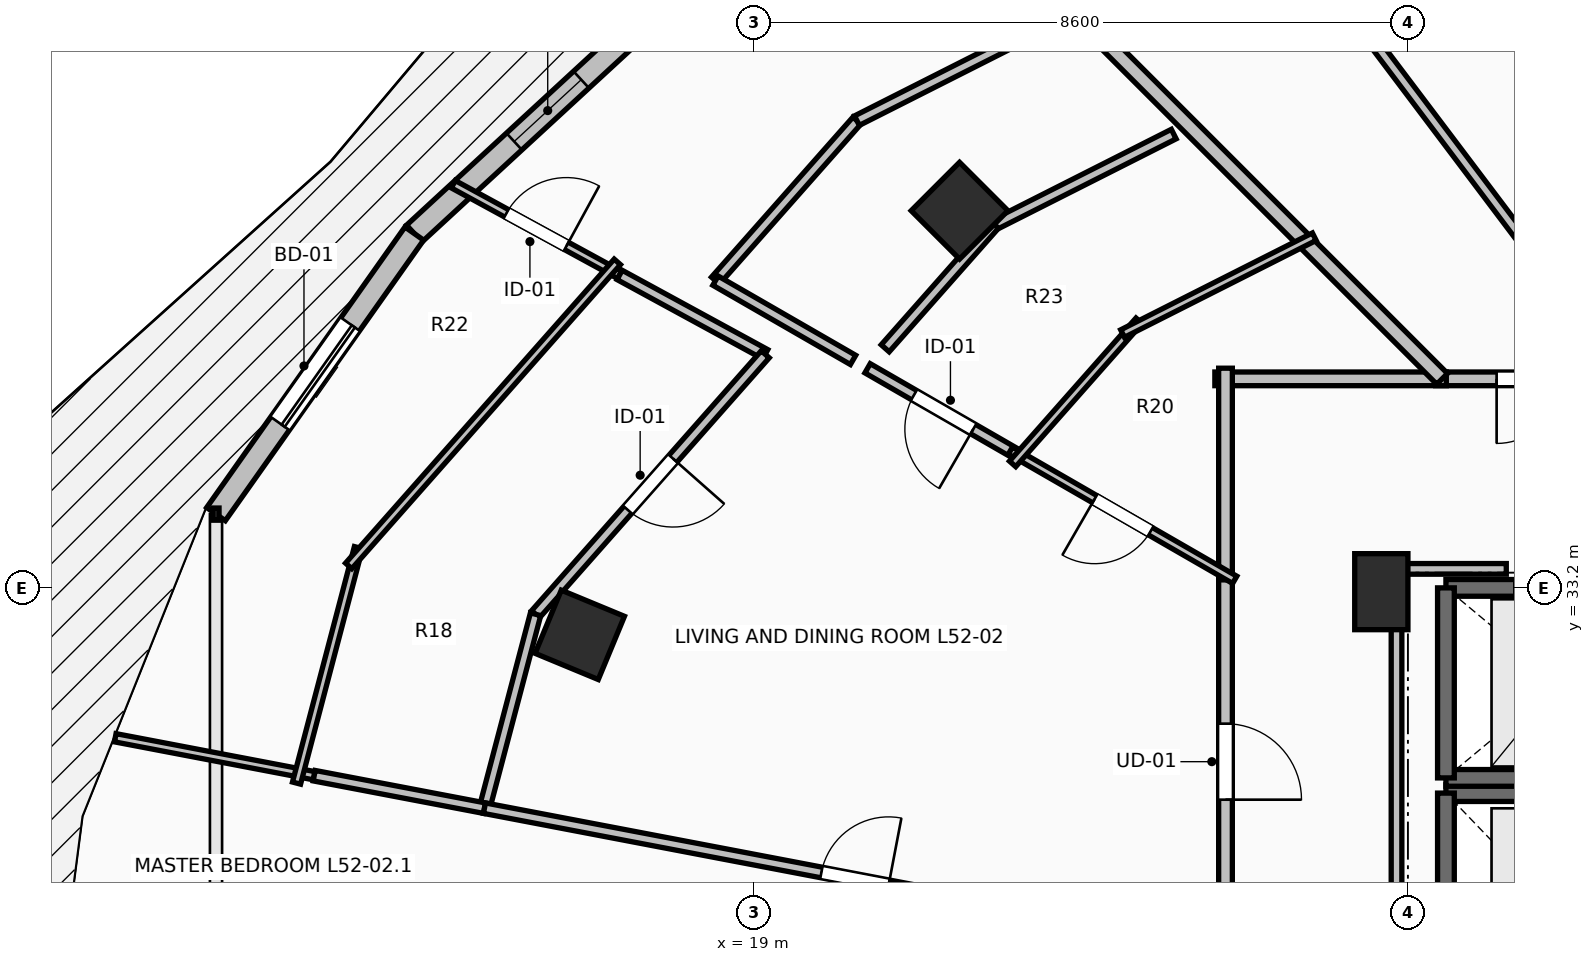
"""IFC4 building model, lengths in metres.
Left out: names, types, materials, properties, quantities, classifications, styles, units other than length and angle.
Written with IfcOpenShell. Run it as: python <this file> out.ifc"""

import sys

from ifc_helpers import new_model, si_unit, direction, frame, frame_2d, origin, origin_2d, place, context, subcontext, project, spatial, rectangle, extrude, element, fill, save


model = new_model("IFC4")
c1 = context("Model", 3, precision=1e-05, world=origin(), true_north=direction((0.0, 1.0)))
c2 = subcontext(c1, "Body", "Model", "MODEL_VIEW")
j1 = project(units=[si_unit("LENGTHUNIT", "METRE"), si_unit("PLANEANGLEUNIT", "RADIAN")], contexts=[c1])
p1 = place(None, origin())
s1 = spatial("IfcSite", under=j1, at=p1, CompositionType="ELEMENT")
p2 = place(p1, origin())
s2 = spatial("IfcBuilding", under=s1, at=p2, CompositionType="ELEMENT")
p3 = place(p2, frame((0.0, 0.0, 193.1)))
s3 = spatial("IfcBuildingStorey", under=s2, at=p3, CompositionType="ELEMENT", Elevation=193.1)
for number, where, z_axis, x_axis in (
    (1, (21.701, 38.162, 0.0), (0.0, 0.0, 1.0), (-0.707, 0.707, 0.0)),
    (2, (16.705, 32.582, 0.0), (0.0, 0.0, 1.0), (-0.924, 0.383, 0.0)),
):
    element("IfcColumn", number, at=place(p3, frame(where, z_axis=z_axis, x_axis=x_axis)), inside=s3, PredefinedType="COLUMN", context=c2, shape_type="SweptSolid", body=[
        extrude(rectangle(XDim=0.9, YDim=0.9, at=origin_2d()), origin(), (0.0, 0.0, 1.0), 3.5),
    ])
p4 = place(p3, frame((27.25, 33.15, 0.0), z_axis=(0.0, 0.0, 1.0), x_axis=(1.0, 0.0, 0.0)))
e3 = element("IfcColumn", 3, at=p4, inside=s3, PredefinedType="PILASTER", context=c2, shape_type="SweptSolid", body=[
    extrude(rectangle(XDim=0.7, YDim=1.0, at=origin_2d()), origin(), (0.0, 0.0, 1.0), 3.5),
])
p5 = place(p3, frame((18.038, 41.097, 0.0), z_axis=(0.0, 0.0, 1.0), x_axis=(-0.735359993374, -0.677676678177, 0.0)))
e4 = element("IfcWall", 4, at=p5, inside=s3, PredefinedType="STANDARD", context=c2, shape_type="SweptSolid", body=[
    extrude(rectangle(XDim=4.774, YDim=0.3, at=frame_2d((2.387, 0.0))), origin(), (0.0, 0.0, 1.0), 3.24),
])
p6 = place(p5, frame((1.787, 0.0, 0.85)))
e5 = element("IfcOpeningElement", 5, at=p6, cuts=e4, PredefinedType="OPENING", context=c2, shape_type="SweptSolid", body=[
    extrude(rectangle(XDim=1.2, YDim=2.1, at=frame_2d((0.6, 1.05))), frame((0.0, 0.165, 0.0), z_axis=(0.0, -1.0, 0.0), x_axis=(1.0, 0.0, 0.0)), (0.0, 0.0, 1.0), 0.33),
])
p7 = place(p3, frame((14.528, 37.861, 0.0), z_axis=(0.0, 0.0, 1.0), x_axis=(-0.577168747264, -0.81662490605, 0.0)))
e6 = element("IfcWall", 6, at=p7, inside=s3, PredefinedType="STANDARD", context=c2, shape_type="SweptSolid", body=[
    extrude(rectangle(XDim=4.52, YDim=0.3, at=frame_2d((2.26, 0.0))), origin(), (0.0, 0.0, 1.0), 3.24),
])
p8 = place(p7, frame((1.46, 0.0, 0.0)))
e7 = element("IfcOpeningElement", 7, at=p8, cuts=e6, PredefinedType="OPENING", context=c2, shape_type="SweptSolid", body=[
    extrude(rectangle(XDim=1.6, YDim=2.3, at=frame_2d((0.8, 1.15))), frame((0.0, 0.165, 0.0), z_axis=(0.0, -1.0, 0.0), x_axis=(1.0, 0.0, 0.0)), (0.0, 0.0, 1.0), 0.33),
])
p9 = place(p3, frame((30.5, 30.5, 0.0), z_axis=(0.0, 0.0, 1.0), x_axis=(-1.0, 0.0, 0.0)))
e8 = element("IfcWall", 8, at=p9, inside=s3, PredefinedType="SHEAR", context=c2, shape_type="SweptSolid", body=[
    extrude(rectangle(XDim=2.4, YDim=0.22, at=frame_2d((1.2, 0.0))), origin(), (0.0, 0.0, 1.0), 3.24),
])
p10 = place(p3, frame((28.1, 30.5, 0.0), z_axis=(0.0, 0.0, 1.0), x_axis=(0.0, -1.0, 0.0)))
e9 = element("IfcWall", 9, at=p10, inside=s3, PredefinedType="SHEAR", context=c2, shape_type="SweptSolid", body=[
    extrude(rectangle(XDim=2.5, YDim=0.22, at=frame_2d((1.25, 0.0))), origin(), (0.0, 0.0, 1.0), 3.24),
])
p11 = place(p3, frame((28.1, 30.7, 0.0), z_axis=(0.0, 0.0, 1.0), x_axis=(1.0, 0.0, 0.0)))
e10 = element("IfcWall", 10, at=p11, inside=s3, PredefinedType="SOLIDWALL", context=c2, shape_type="SweptSolid", body=[
    extrude(rectangle(XDim=3.0, YDim=0.22, at=frame_2d((1.5, 0.0))), origin(), (0.0, 0.0, 1.0), 3.24),
])
p12 = place(p3, frame((31.1, 33.2, 0.0), z_axis=(0.0, 0.0, 1.0), x_axis=(-1.0, 0.0, 0.0)))
e11 = element("IfcWall", 11, at=p12, inside=s3, PredefinedType="SOLIDWALL", context=c2, shape_type="SweptSolid", body=[
    extrude(rectangle(XDim=3.0, YDim=0.22, at=frame_2d((1.5, 0.0))), origin(), (0.0, 0.0, 1.0), 3.24),
])
p13 = place(p12, frame((0.9, 0.0, 0.0)))
e12 = element("IfcOpeningElement", 12, at=p13, cuts=e11, PredefinedType="OPENING", context=c2, shape_type="SweptSolid", body=[
    extrude(rectangle(XDim=1.2, YDim=2.2, at=frame_2d((0.6, 1.1))), frame((0.0, 0.125, 0.0), z_axis=(0.0, -1.0, 0.0), x_axis=(1.0, 0.0, 0.0)), (0.0, 0.0, 1.0), 0.25),
])
p14 = place(p3, frame((28.1, 33.2, 0.0), z_axis=(0.0, 0.0, 1.0), x_axis=(0.0, -1.0, 0.0)))
e13 = element("IfcWall", 13, at=p14, inside=s3, PredefinedType="SOLIDWALL", context=c2, shape_type="SweptSolid", body=[
    extrude(rectangle(XDim=2.5, YDim=0.22, at=frame_2d((1.25, 0.0))), origin(), (0.0, 0.0, 1.0), 3.24),
])
p15 = place(p3, frame((30.419, 35.95, 0.0), z_axis=(0.0, 0.0, 1.0), x_axis=(-1.0, 0.0, 0.0)))
e14 = element("IfcWall", 14, at=p15, inside=s3, PredefinedType="PARTITIONING", context=c2, shape_type="SweptSolid", body=[
    extrude(rectangle(XDim=2.454, YDim=0.18, at=frame_2d((1.227, 0.0))), origin(), (0.0, 0.0, 1.0), 2.432),
])
p16 = place(p15, frame((0.802, 0.0, 0.0)))
e15 = element("IfcOpeningElement", 15, at=p16, cuts=e14, PredefinedType="OPENING", context=c2, shape_type="SweptSolid", body=[
    extrude(rectangle(XDim=0.85, YDim=2.1, at=frame_2d((0.425, 1.05))), frame((0.0, 0.105, 0.0), z_axis=(0.0, -1.0, 0.0), x_axis=(1.0, 0.0, 0.0)), (0.0, 0.0, 1.0), 0.21),
])
p17 = place(p3, frame((25.2, 33.445, 0.0), z_axis=(0.0, 0.0, 1.0), x_axis=(0.0, -1.0, 0.0)))
e16 = element("IfcWall", 16, at=p17, inside=s3, PredefinedType="PARTITIONING", context=c2, shape_type="SweptSolid", body=[
    extrude(rectangle(XDim=5.063, YDim=0.18, at=frame_2d((2.531, 0.0))), origin(), (0.0, 0.0, 1.0), 2.432),
])
p18 = place(p17, frame((2.031, 0.0, 0.0)))
e17 = element("IfcOpeningElement", 17, at=p18, cuts=e16, PredefinedType="OPENING", context=c2, shape_type="SweptSolid", body=[
    extrude(rectangle(XDim=1.0, YDim=2.15, at=frame_2d((0.5, 1.075))), frame((0.0, 0.105, 0.0), z_axis=(0.0, -1.0, 0.0), x_axis=(1.0, 0.0, 0.0)), (0.0, 0.0, 1.0), 0.21),
])
p19 = place(p3, frame((28.105, 35.95, 0.0), z_axis=(0.0, 0.0, 1.0), x_axis=(-1.0, 0.0, 0.0)))
e18 = element("IfcWall", 18, at=p19, inside=s3, PredefinedType="PARTITIONING", context=c2, shape_type="SweptSolid", body=[
    extrude(rectangle(XDim=3.045, YDim=0.18, at=frame_2d((1.522, 0.0))), origin(), (0.0, 0.0, 1.0), 2.432),
])
p20 = place(p3, frame((25.2, 36.09, 0.0), z_axis=(0.0, 0.0, 1.0), x_axis=(0.0, -1.0, 0.0)))
e19 = element("IfcWall", 19, at=p20, inside=s3, PredefinedType="PARTITIONING", context=c2, shape_type="SweptSolid", body=[
    extrude(rectangle(XDim=2.785, YDim=0.18, at=frame_2d((1.393, 0.0))), origin(), (0.0, 0.0, 1.0), 2.432),
])
p21 = place(p3, frame((27.069, 45.673, 0.0), z_axis=(0.0, 0.0, 1.0), x_axis=(0.485717471054, -0.874115860921, 0.0)))
e20 = element("IfcWall", 20, at=p21, inside=s3, PredefinedType="PARTITIONING", context=c2, shape_type="SweptSolid", body=[
    extrude(rectangle(XDim=11.123, YDim=0.14, at=frame_2d((5.562, 0.0))), origin(), (0.0, 0.0, 1.0), 2.432),
])
p22 = place(p3, frame((24.075, 44.46, 0.0), z_axis=(0.0, 0.0, 1.0), x_axis=(0.602185523072, -0.798356183544, 0.0)))
e21 = element("IfcWall", 21, at=p22, inside=s3, PredefinedType="PARTITIONING", context=c2, shape_type="SweptSolid", body=[
    extrude(rectangle(XDim=10.659, YDim=0.14, at=frame_2d((5.33, 0.0))), origin(), (0.0, 0.0, 1.0), 2.432),
])
p23 = place(p3, frame((21.041, 42.959, 0.0), z_axis=(0.0, 0.0, 1.0), x_axis=(0.707106781187, -0.707106781187, 0.0)))
e22 = element("IfcWall", 22, at=p23, inside=s3, PredefinedType="PARTITIONING", context=c2, shape_type="SweptSolid", body=[
    extrude(rectangle(XDim=9.912, YDim=0.2, at=frame_2d((4.956, 0.0))), origin(), (0.0, 0.0, 1.0), 2.432),
])
p24 = place(p3, frame((22.492, 34.936, 0.0), z_axis=(0.0, 0.0, 1.0), x_axis=(-0.866435390844, 0.499289208267, 0.0)))
e23 = element("IfcWall", 23, at=p24, inside=s3, PredefinedType="PARTITIONING", context=c2, shape_type="SweptSolid", body=[
    extrude(rectangle(XDim=2.309, YDim=0.14, at=frame_2d((1.155, 0.0))), origin(), (0.0, 0.0, 1.0), 2.922),
])
p25 = place(p24, frame((0.705, 0.0, 0.0)))
e24 = element("IfcOpeningElement", 24, at=p25, cuts=e23, PredefinedType="OPENING", context=c2, shape_type="SweptSolid", body=[
    extrude(rectangle(XDim=0.9, YDim=2.1, at=frame_2d((0.45, 1.05))), frame((0.0, 0.085, 0.0), z_axis=(0.0, -1.0, 0.0), x_axis=(1.0, 0.0, 0.0)), (0.0, 0.0, 1.0), 0.17),
])
p26 = place(p3, frame((25.321, 33.306, 0.0), z_axis=(0.0, 0.0, 1.0), x_axis=(-0.866517217622, 0.49914718427, 0.0)))
e25 = element("IfcWall", 25, at=p26, inside=s3, PredefinedType="PARTITIONING", context=c2, shape_type="SweptSolid", body=[
    extrude(rectangle(XDim=3.405, YDim=0.11, at=frame_2d((1.703, 0.0))), origin(), (0.0, 0.0, 1.0), 2.922),
])
p27 = place(p26, frame((1.278, 0.0, 0.0)))
e26 = element("IfcOpeningElement", 26, at=p27, cuts=e25, PredefinedType="OPENING", context=c2, shape_type="SweptSolid", body=[
    extrude(rectangle(XDim=0.85, YDim=2.1, at=frame_2d((0.425, 1.05))), frame((0.0, 0.07, 0.0), z_axis=(0.0, -1.0, 0.0), x_axis=(1.0, 0.0, 0.0)), (0.0, 0.0, 1.0), 0.14),
])
p28 = place(p3, frame((15.041, 38.51, 0.0), z_axis=(0.0, 0.0, 1.0), x_axis=(0.877951724479, -0.478749171784, 0.0)))
e27 = element("IfcWall", 27, at=p28, inside=s3, PredefinedType="PARTITIONING", context=c2, shape_type="SweptSolid", body=[
    extrude(rectangle(XDim=2.492, YDim=0.11, at=frame_2d((1.246, 0.0))), origin(), (0.0, 0.0, 1.0), 3.24),
])
p29 = place(p28, frame((0.796, 0.0, 0.0)))
e28 = element("IfcOpeningElement", 28, at=p29, cuts=e27, PredefinedType="OPENING", context=c2, shape_type="SweptSolid", body=[
    extrude(rectangle(XDim=0.9, YDim=2.1, at=frame_2d((0.45, 1.05))), frame((0.0, 0.07, 0.0), z_axis=(0.0, -1.0, 0.0), x_axis=(1.0, 0.0, 0.0)), (0.0, 0.0, 1.0), 0.14),
])
p30 = place(p3, frame((13.21, 30.729, 0.0), z_axis=(0.0, 0.0, 1.0), x_axis=(-0.982266305937, 0.187491077708, 0.0)))
e29 = element("IfcWall", 29, at=p30, inside=s3, PredefinedType="PARTITIONING", context=c2, shape_type="SweptSolid", body=[
    extrude(rectangle(XDim=2.664, YDim=0.11, at=frame_2d((1.332, 0.0))), origin(), (0.0, 0.0, 1.0), 3.24),
])
p31 = place(p3, frame((17.229, 37.317, 0.0), z_axis=(0.0, 0.0, 1.0), x_axis=(0.878117834212, -0.47844442649, 0.0)))
e30 = element("IfcWall", 30, at=p31, inside=s3, PredefinedType="PARTITIONING", context=c2, shape_type="SweptSolid", body=[
    extrude(rectangle(XDim=2.182, YDim=0.14, at=frame_2d((1.091, 0.0))), origin(), (0.0, 0.0, 1.0), 3.24),
])
p32 = place(p3, frame((19.145, 36.273, 0.0), z_axis=(0.0, 0.0, 1.0), x_axis=(-0.662162868769, -0.749359950373, 0.0)))
e31 = element("IfcWall", 31, at=p32, inside=s3, PredefinedType="PARTITIONING", context=c2, shape_type="SweptSolid", body=[
    extrude(rectangle(XDim=4.564, YDim=0.14, at=frame_2d((2.282, 0.0))), origin(), (0.0, 0.0, 1.0), 3.24),
])
p33 = place(p32, frame((1.832, 0.0, 0.0)))
e32 = element("IfcOpeningElement", 32, at=p33, cuts=e31, PredefinedType="OPENING", context=c2, shape_type="SweptSolid", body=[
    extrude(rectangle(XDim=0.9, YDim=2.1, at=frame_2d((0.45, 1.05))), frame((0.0, 0.085, 0.0), z_axis=(0.0, -1.0, 0.0), x_axis=(1.0, 0.0, 0.0)), (0.0, 0.0, 1.0), 0.17),
])
p34 = place(p3, frame((16.123, 32.853, 0.0), z_axis=(0.0, 0.0, 1.0), x_axis=(-0.254775717765, -0.967000172512, 0.0)))
e33 = element("IfcWall", 33, at=p34, inside=s3, PredefinedType="PARTITIONING", context=c2, shape_type="SweptSolid", body=[
    extrude(rectangle(XDim=2.638, YDim=0.14, at=frame_2d((1.319, 0.0))), origin(), (0.0, 0.0, 1.0), 3.24),
])
p35 = place(p3, frame((15.451, 30.302, 0.0), z_axis=(0.0, 0.0, 1.0), x_axis=(-0.982295439063, 0.187338384738, 0.0)))
e34 = element("IfcWall", 34, at=p35, inside=s3, PredefinedType="PARTITIONING", context=c2, shape_type="SweptSolid", body=[
    extrude(rectangle(XDim=2.281, YDim=0.14, at=frame_2d((1.14, 0.0))), origin(), (0.0, 0.0, 1.0), 3.24),
])
p36 = place(p3, frame((15.451, 30.302, 0.0), z_axis=(0.0, 0.0, 1.0), x_axis=(0.982284698783, -0.187394691859, 0.0)))
e35 = element("IfcWall", 35, at=p36, inside=s3, PredefinedType="PARTITIONING", context=c2, shape_type="SweptSolid", body=[
    extrude(rectangle(XDim=9.925, YDim=0.14, at=frame_2d((4.962, 0.0))), origin(), (0.0, 0.0, 1.0), 2.774),
])
p37 = place(p36, frame((4.512, 0.0, 0.0)))
e36 = element("IfcOpeningElement", 36, at=p37, cuts=e35, PredefinedType="OPENING", context=c2, shape_type="SweptSolid", body=[
    extrude(rectangle(XDim=0.9, YDim=2.1, at=frame_2d((0.45, 1.05))), frame((0.0, 0.085, 0.0), z_axis=(0.0, -1.0, 0.0), x_axis=(1.0, 0.0, 0.0)), (0.0, 0.0, 1.0), 0.17),
])
p38 = place(p3, frame((22.399, 34.831, 0.0), z_axis=(0.0, 0.0, 1.0), x_axis=(0.662292938072, 0.749244996099, 0.0)))
e37 = element("IfcWall", 37, at=p38, inside=s3, PredefinedType="PARTITIONING", context=c2, shape_type="SweptSolid", body=[
    extrude(rectangle(XDim=2.513, YDim=0.11, at=frame_2d((1.256, 0.0))), origin(), (0.0, 0.0, 1.0), 2.432),
])
p39 = place(p3, frame((23.846, 36.546, 0.0), z_axis=(0.0, 0.0, 1.0), x_axis=(0.892553076465, 0.450942352959, 0.0)))
e38 = element("IfcWall", 38, at=p39, inside=s3, PredefinedType="PARTITIONING", context=c2, shape_type="SweptSolid", body=[
    extrude(rectangle(XDim=2.826, YDim=0.11, at=frame_2d((1.413, 0.0))), origin(), (0.0, 0.0, 1.0), 2.432),
])
p40 = place(p3, frame((12.979, 30.632, 0.0), z_axis=(0.0, 0.0, 1.0), x_axis=(0.254121849718, 0.967172210879, 0.0)))
e39 = element("IfcWall", 39, at=p40, inside=s3, PredefinedType="PARTITIONING", context=c2, shape_type="SweptSolid", body=[
    extrude(rectangle(XDim=3.203, YDim=0.11, at=frame_2d((1.602, 0.0))), origin(), (0.0, 0.0, 1.0), 3.24),
])
p41 = place(p3, frame((13.664, 33.489, 0.0), z_axis=(0.0, 0.0, 1.0), x_axis=(0.662149418065, 0.74937183571, 0.0)))
e40 = element("IfcWall", 40, at=p41, inside=s3, PredefinedType="PARTITIONING", context=c2, shape_type="SweptSolid", body=[
    extrude(rectangle(XDim=5.338, YDim=0.11, at=frame_2d((2.669, 0.0))), origin(), (0.0, 0.0, 1.0), 3.24),
])
p42 = place(p3, frame((28.894, 33.45, 0.0), z_axis=(0.0, 0.0, 1.0), x_axis=(-1.0, 0.0, 0.0)))
e41 = element("IfcWall", 41, at=p42, inside=s3, PredefinedType="PARTITIONING", context=c2, shape_type="SweptSolid", body=[
    extrude(rectangle(XDim=1.444, YDim=0.14, at=frame_2d((0.722, 0.0))), origin(), (0.0, 0.0, 1.0), 2.432),
])
p43 = place(p3, frame((27.45, 33.45, 0.0), z_axis=(0.0, 0.0, 1.0), x_axis=(0.0, -1.0, 0.0)))
e42 = element("IfcWall", 42, at=p43, inside=s3, PredefinedType="PARTITIONING", context=c2, shape_type="SweptSolid", body=[
    extrude(rectangle(XDim=5.254, YDim=0.14, at=frame_2d((2.627, 0.0))), origin(), (0.0, 0.0, 1.0), 2.432),
])
p44 = place(p3, frame((18.49, 37.242, 0.0), z_axis=(0.0, 0.0, 1.0), x_axis=(0.662371376331, 0.749175653513, 0.0)))
e43 = element("IfcWall", 43, at=p44, inside=s3, PredefinedType="PARTITIONING", context=c2, shape_type="SweptSolid", body=[
    extrude(rectangle(XDim=2.81, YDim=0.14, at=frame_2d((1.405, 0.0))), origin(), (0.0, 0.0, 1.0), 3.24),
])
p45 = place(p3, frame((20.351, 39.347, 0.0), z_axis=(0.0, 0.0, 1.0), x_axis=(0.89244587056, 0.451154483653, 0.0)))
e44 = element("IfcWall", 44, at=p45, inside=s3, PredefinedType="PARTITIONING", context=c2, shape_type="SweptSolid", body=[
    extrude(rectangle(XDim=2.97, YDim=0.14, at=frame_2d((1.485, 0.0))), origin(), (0.0, 0.0, 1.0), 3.24),
])
p46 = place(p3, frame((20.3, 36.199, 0.0), z_axis=(0.0, 0.0, 1.0), x_axis=(-0.86645395742, 0.499256987604, 0.0)))
e45 = element("IfcWall", 45, at=p46, inside=s3, PredefinedType="PARTITIONING", context=c2, shape_type="SweptSolid", body=[
    extrude(rectangle(XDim=2.089, YDim=0.14, at=frame_2d((1.044, 0.0))), origin(), (0.0, 0.0, 1.0), 2.774),
])
p47 = place(p3, frame((24.519, 39.17, 0.0), z_axis=(0.0, 0.0, 1.0), x_axis=(-0.89247840077, -0.451090128643, 0.0)))
e46 = element("IfcWall", 46, at=p47, inside=s3, PredefinedType="PARTITIONING", context=c2, shape_type="SweptSolid", body=[
    extrude(rectangle(XDim=2.642, YDim=0.14, at=frame_2d((1.321, 0.0))), origin(), (0.0, 0.0, 1.0), 2.432),
])
p48 = place(p3, frame((22.161, 37.978, 0.0), z_axis=(0.0, 0.0, 1.0), x_axis=(-0.662476802918, -0.749082429106, 0.0)))
e47 = element("IfcWall", 47, at=p48, inside=s3, PredefinedType="PARTITIONING", context=c2, shape_type="SweptSolid", body=[
    extrude(rectangle(XDim=2.171, YDim=0.14, at=frame_2d((1.085, 0.0))), origin(), (0.0, 0.0, 1.0), 2.432),
])
p49 = place(p8, origin())
e48 = element("IfcDoor", 48, at=p49, inside=s3, OperationType="SLIDING_TO_LEFT", PredefinedType="DOOR", context=c2, shape_type="SweptSolid", body=[
    extrude(rectangle(XDim=1.6, YDim=2.3, at=frame_2d((0.8, 1.15))), frame((0.0, 0.025, 0.0), z_axis=(0.0, -1.0, 0.0), x_axis=(1.0, 0.0, 0.0)), (0.0, 0.0, 1.0), 0.05),
])
fill(e7, e48)
p50 = place(p6, origin())
e49 = element("IfcWindow", 49, at=p50, inside=s3, PartitioningType="SINGLE_PANEL", PredefinedType="WINDOW", context=c2, shape_type="SweptSolid", body=[
    extrude(rectangle(XDim=1.2, YDim=2.1, at=frame_2d((0.6, 1.05))), frame((0.0, 0.03, 0.0), z_axis=(0.0, -1.0, 0.0), x_axis=(1.0, 0.0, 0.0)), (0.0, 0.0, 1.0), 0.06),
])
fill(e5, e49)
p51 = place(p13, origin())
e50 = element("IfcDoor", 50, at=p51, inside=s3, OperationType="SLIDING_TO_LEFT", PredefinedType="DOOR", context=c2, shape_type="SweptSolid", body=[
    extrude(rectangle(XDim=1.2, YDim=2.2, at=frame_2d((0.6, 1.1))), frame((0.0, 0.025, 0.0), z_axis=(0.0, -1.0, 0.0), x_axis=(1.0, 0.0, 0.0)), (0.0, 0.0, 1.0), 0.05),
])
fill(e12, e50)
p52 = place(p18, origin())
e51 = element("IfcDoor", 51, at=p52, inside=s3, OperationType="SINGLE_SWING_RIGHT", PredefinedType="DOOR", context=c2, shape_type="SweptSolid", body=[
    extrude(rectangle(XDim=1.0, YDim=2.15, at=frame_2d((0.5, 1.075))), frame((0.0, 0.025, 0.0), z_axis=(0.0, -1.0, 0.0), x_axis=(1.0, 0.0, 0.0)), (0.0, 0.0, 1.0), 0.05),
])
fill(e17, e51)
p53 = place(p25, origin())
e52 = element("IfcDoor", 52, at=p53, inside=s3, OperationType="SINGLE_SWING_LEFT", PredefinedType="DOOR", context=c2, shape_type="SweptSolid", body=[
    extrude(rectangle(XDim=0.9, YDim=2.1, at=frame_2d((0.45, 1.05))), frame((0.0, 0.025, 0.0), z_axis=(0.0, -1.0, 0.0), x_axis=(1.0, 0.0, 0.0)), (0.0, 0.0, 1.0), 0.05),
])
fill(e24, e52)
p54 = place(p27, origin())
e53 = element("IfcDoor", 53, at=p54, inside=s3, OperationType="SINGLE_SWING_RIGHT", PredefinedType="DOOR", context=c2, shape_type="SweptSolid", body=[
    extrude(rectangle(XDim=0.85, YDim=2.1, at=frame_2d((0.425, 1.05))), frame((0.0, 0.025, 0.0), z_axis=(0.0, -1.0, 0.0), x_axis=(1.0, 0.0, 0.0)), (0.0, 0.0, 1.0), 0.05),
])
fill(e26, e53)
p55 = place(p29, origin())
e54 = element("IfcDoor", 54, at=p55, inside=s3, OperationType="SINGLE_SWING_RIGHT", PredefinedType="DOOR", context=c2, shape_type="SweptSolid", body=[
    extrude(rectangle(XDim=0.9, YDim=2.1, at=frame_2d((0.45, 1.05))), frame((0.0, 0.025, 0.0), z_axis=(0.0, -1.0, 0.0), x_axis=(1.0, 0.0, 0.0)), (0.0, 0.0, 1.0), 0.05),
])
fill(e28, e54)
p56 = place(p33, origin())
e55 = element("IfcDoor", 55, at=p56, inside=s3, OperationType="SINGLE_SWING_LEFT", PredefinedType="DOOR", context=c2, shape_type="SweptSolid", body=[
    extrude(rectangle(XDim=0.9, YDim=2.1, at=frame_2d((0.45, 1.05))), frame((0.0, 0.025, 0.0), z_axis=(0.0, -1.0, 0.0), x_axis=(1.0, 0.0, 0.0)), (0.0, 0.0, 1.0), 0.05),
])
fill(e32, e55)
p57 = place(p37, origin())
e56 = element("IfcDoor", 56, at=p57, inside=s3, OperationType="SINGLE_SWING_RIGHT", PredefinedType="DOOR", context=c2, shape_type="SweptSolid", body=[
    extrude(rectangle(XDim=0.9, YDim=2.1, at=frame_2d((0.45, 1.05))), frame((0.0, 0.025, 0.0), z_axis=(0.0, -1.0, 0.0), x_axis=(1.0, 0.0, 0.0)), (0.0, 0.0, 1.0), 0.05),
])
fill(e36, e56)
p58 = place(p16, origin())
e57 = element("IfcDoor", 57, at=p58, inside=s3, OperationType="SINGLE_SWING_RIGHT", PredefinedType="DOOR", context=c2, shape_type="SweptSolid", body=[
    extrude(rectangle(XDim=0.85, YDim=2.1, at=frame_2d((0.425, 1.05))), frame((0.0, 0.025, 0.0), z_axis=(0.0, -1.0, 0.0), x_axis=(1.0, 0.0, 0.0)), (0.0, 0.0, 1.0), 0.05),
])
fill(e15, e57)
save(model, sys.argv[1])
